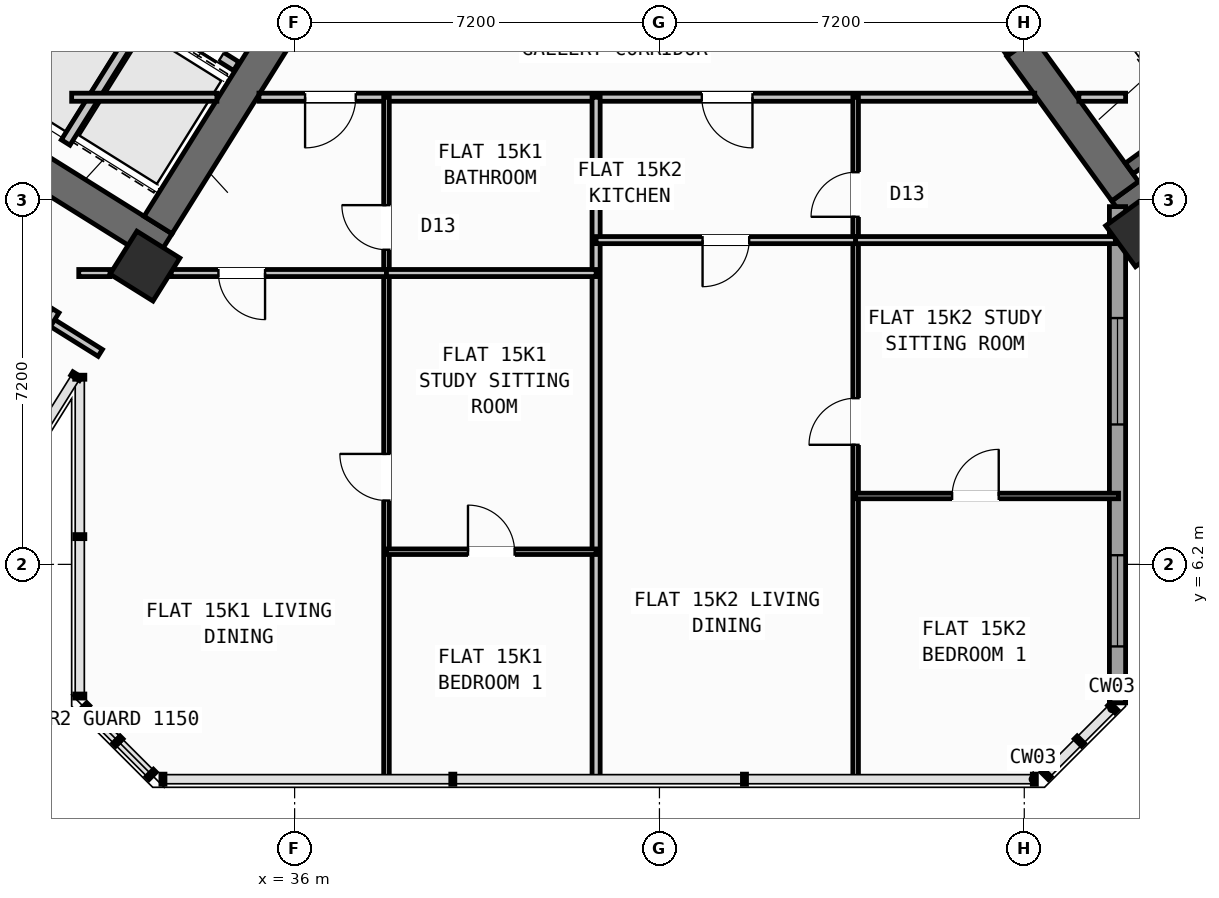
"""IFC4 building model, lengths in metres.
Left out: names, types, materials, properties, quantities, classifications, styles, units other than length and angle.
Written with IfcOpenShell. Run it as: python <this file> out.ifc"""

import sys

from ifc_helpers import new_model, si_unit, direction, frame, frame_2d, origin, origin_2d, place, context, subcontext, project, spatial, rectangle, hollow_rectangle, extrude, source, transform, mapped, element, fill, save


model = new_model("IFC4")
c1 = context("Model", 3, precision=1e-05, world=origin(), true_north=direction((0.0, 1.0)))
c2 = subcontext(c1, "Body", "Model", "MODEL_VIEW")
j1 = project(units=[si_unit("LENGTHUNIT", "METRE"), si_unit("PLANEANGLEUNIT", "RADIAN")], contexts=[c1])
p1 = place(None, origin())
s1 = spatial("IfcSite", under=j1, at=p1, CompositionType="ELEMENT")
p2 = place(p1, origin())
s2 = spatial("IfcBuilding", under=s1, at=p2, CompositionType="ELEMENT")
p3 = place(p2, frame((0.0, 0.0, 60.0)))
s3 = spatial("IfcBuildingStorey", under=s2, at=p3, CompositionType="ELEMENT", Elevation=60.0)
p4 = place(p3, frame((33.409, 12.45, 0.0), z_axis=(0.0, 0.0, 1.0), x_axis=(-0.848051132073, 0.529914405721, 0.0)))
e1 = element("IfcWall", 1, at=p4, inside=s3, PredefinedType="SHEAR", context=c2, shape_type="SweptSolid", body=[
    extrude(rectangle(XDim=13.24, YDim=0.65, at=frame_2d((6.62, 0.0))), origin(), (0.0, 0.0, 1.0), 3.35),
])
p5 = place(p3, frame((36.683, 18.304, 0.0), z_axis=(0.0, 0.0, 1.0), x_axis=(-0.529899109053, -0.848060690178, 0.0)))
e2 = element("IfcWall", 2, at=p5, inside=s3, PredefinedType="SHEAR", context=c2, shape_type="SweptSolid", body=[
    extrude(rectangle(XDim=6.375, YDim=0.65, at=frame_2d((3.188, 0.0))), origin(), (0.0, 0.0, 1.0), 3.35),
])
p6 = place(p3, frame((52.318, 13.11, 0.0), z_axis=(0.0, 0.0, 1.0), x_axis=(0.809019445368, 0.587781878776, 0.0)))
e3 = element("IfcWall", 3, at=p6, inside=s3, PredefinedType="SHEAR", context=c2, shape_type="SweptSolid", body=[
    extrude(rectangle(XDim=12.44, YDim=0.65, at=frame_2d((6.22, 0.0))), origin(), (0.0, 0.0, 1.0), 3.35),
])
p7 = place(p3, frame((52.39, 13.564, 0.0), z_axis=(0.0, 0.0, 1.0), x_axis=(-0.58779688989, 0.809008539037, 0.0)))
e4 = element("IfcWall", 4, at=p7, inside=s3, PredefinedType="SHEAR", context=c2, shape_type="SweptSolid", body=[
    extrude(rectangle(XDim=3.525, YDim=0.65, at=frame_2d((1.763, 0.0))), origin(), (0.0, 0.0, 1.0), 3.35),
])
m1 = source(origin(), c2, "Body", "SweptSolid", [
    extrude(hollow_rectangle(XDim=1.0, YDim=1.0, WallThickness=0.04, at=origin_2d()), origin(), (0.0, 0.0, 1.0), 3.6),
])
for number, where, z_axis, x_axis in (
    (5, (33.046, 12.087, 0.0), (0.0, 0.0, 1.0), (-0.848, 0.53, 0.0)),
    (6, (52.705, 12.773, 0.0), (0.0, 0.0, 1.0), (0.809, 0.588, 0.0)),
):
    element("IfcColumn", number, at=place(p3, frame(where, z_axis=z_axis, x_axis=x_axis)), inside=s3, PredefinedType="COLUMN", context=c2, shape_type="MappedRepresentation", body=[
        mapped(m1, transform((0.0, 0.0, 0.0), scale=1.0)),
    ])
p8 = place(p3, frame((56.581, 7.439, 0.0), z_axis=(0.0, 0.0, 1.0), x_axis=(-0.587785875463, 0.809016541614, 0.0)))
e7 = element("IfcWall", 7, at=p8, inside=s3, PredefinedType="STANDARD", context=c2, shape_type="SweptSolid", body=[
    extrude(rectangle(XDim=6.774, YDim=0.32, at=frame_2d((3.387, 0.0))), origin(), (0.0, 0.0, 1.0), 2.725),
])
p9 = place(p8, frame((1.556, 0.0, 0.8)))
e8 = element("IfcOpeningElement", 8, at=p9, cuts=e7, PredefinedType="OPENING", context=c2, shape_type="SweptSolid", body=[
    extrude(rectangle(XDim=2.1, YDim=1.55, at=frame_2d((1.05, 0.775))), frame((0.0, 0.17, 0.0), z_axis=(0.0, -1.0, 0.0), x_axis=(1.0, 0.0, 0.0)), (0.0, 0.0, 1.0), 0.34),
])
p10 = place(p3, frame((52.24, 13.261, 0.0), z_axis=(0.0, 0.0, 1.0), x_axis=(0.0, -1.0, 0.0)))
e9 = element("IfcWall", 9, at=p10, inside=s3, PredefinedType="STANDARD", context=c2, shape_type="SweptSolid", body=[
    extrude(rectangle(XDim=9.795, YDim=0.32, at=frame_2d((4.897, 0.0))), origin(), (0.0, 0.0, 1.0), 3.35),
])
p11 = place(p10, frame((2.199, 0.0, 0.8)))
e10 = element("IfcOpeningElement", 10, at=p11, cuts=e9, PredefinedType="OPENING", context=c2, shape_type="SweptSolid", body=[
    extrude(rectangle(XDim=2.1, YDim=1.55, at=frame_2d((1.05, 0.775))), frame((0.0, 0.17, 0.0), z_axis=(0.0, -1.0, 0.0), x_axis=(1.0, 0.0, 0.0)), (0.0, 0.0, 1.0), 0.34),
])
p12 = place(p10, frame((6.88, 0.0, 0.85)))
e11 = element("IfcOpeningElement", 11, at=p12, cuts=e9, PredefinedType="OPENING", context=c2, shape_type="SweptSolid", body=[
    extrude(rectangle(XDim=1.8, YDim=1.5, at=frame_2d((0.9, 0.75))), frame((0.0, 0.17, 0.0), z_axis=(0.0, -1.0, 0.0), x_axis=(1.0, 0.0, 0.0)), (0.0, 0.0, 1.0), 0.34),
])
p13 = place(p3, frame((31.288, 18.256, 0.0), z_axis=(0.0, 0.0, 1.0), x_axis=(-0.529943379326, -0.848033026897, 0.0)))
e12 = element("IfcWall", 12, at=p13, inside=s3, PredefinedType="SHEAR", context=c2, shape_type="SweptSolid", body=[
    extrude(rectangle(XDim=3.16, YDim=0.26, at=frame_2d((1.58, 0.0))), origin(), (0.0, 0.0, 1.0), 3.35),
])
p14 = place(p3, frame((34.848, 16.031, 0.0), z_axis=(0.0, 0.0, 1.0), x_axis=(-0.848044042236, 0.529925751807, 0.0)))
e13 = element("IfcWall", 13, at=p14, inside=s3, PredefinedType="STANDARD", context=c2, shape_type="SweptSolid", body=[
    extrude(rectangle(XDim=4.198, YDim=0.2, at=frame_2d((2.099, 0.0))), origin(), (0.0, 0.0, 1.0), 3.34),
])
p15 = place(p14, frame((0.348, 0.0, 0.0)))
e14 = element("IfcOpeningElement", 14, at=p15, cuts=e13, PredefinedType="OPENING", context=c2, shape_type="SweptSolid", body=[
    extrude(rectangle(XDim=1.3, YDim=2.2, at=frame_2d((0.65, 1.1))), frame((0.0, 0.11, 0.0), z_axis=(0.0, -1.0, 0.0), x_axis=(1.0, 0.0, 0.0)), (0.0, 0.0, 1.0), 0.22),
])
p16 = place(p14, frame((2.423, 0.0, 0.0)))
e15 = element("IfcOpeningElement", 15, at=p16, cuts=e13, PredefinedType="OPENING", context=c2, shape_type="SweptSolid", body=[
    extrude(rectangle(XDim=1.45, YDim=2.25, at=frame_2d((0.725, 1.125))), frame((0.0, 0.11, 0.0), z_axis=(0.0, -1.0, 0.0), x_axis=(1.0, 0.0, 0.0)), (0.0, 0.0, 1.0), 0.22),
])
p17 = place(p3, frame((33.029, 17.003, 0.0), z_axis=(0.0, 0.0, 1.0), x_axis=(-0.529916267533, -0.848049968695, 0.0)))
e16 = element("IfcWall", 16, at=p17, inside=s3, PredefinedType="STANDARD", context=c2, shape_type="SweptSolid", body=[
    extrude(rectangle(XDim=2.92, YDim=0.2, at=frame_2d((1.46, 0.0))), origin(), (0.0, 0.0, 1.0), 3.34),
])
p18 = place(p3, frame((52.472, 14.013, 0.0), z_axis=(0.0, 0.0, 1.0), x_axis=(0.809028366311, 0.587769599847, 0.0)))
e17 = element("IfcWall", 17, at=p18, inside=s3, PredefinedType="SHEAR", context=c2, shape_type="SweptSolid", body=[
    extrude(rectangle(XDim=7.33, YDim=0.26, at=frame_2d((3.665, 0.0))), origin(), (0.0, 0.0, 1.0), 3.35),
])
p19 = place(p3, frame((32.164, 10.374, 0.0), z_axis=(0.0, 0.0, 1.0), x_axis=(-0.848044107957, 0.529925646633, 0.0)))
e18 = element("IfcWall", 18, at=p19, inside=s3, PredefinedType="PARTITIONING", context=c2, shape_type="SweptSolid", body=[
    extrude(rectangle(XDim=15.57, YDim=0.16, at=frame_2d((7.785, 0.0))), origin(), (0.0, 0.0, 1.0), 3.34),
])
p20 = place(p19, frame((10.83, 0.0, 0.0)))
e19 = element("IfcOpeningElement", 19, at=p20, cuts=e18, PredefinedType="OPENING", context=c2, shape_type="SweptSolid", body=[
    extrude(rectangle(XDim=1.0, YDim=2.1, at=frame_2d((0.5, 1.05))), frame((0.0, 0.09, 0.0), z_axis=(0.0, -1.0, 0.0), x_axis=(1.0, 0.0, 0.0)), (0.0, 0.0, 1.0), 0.18),
])
p21 = place(p3, frame((31.282, 11.208, 0.0), z_axis=(0.0, 0.0, 1.0), x_axis=(-0.529938869374, -0.84803584519, 0.0)))
e20 = element("IfcWall", 20, at=p21, inside=s3, PredefinedType="PARTITIONING", context=c2, shape_type="SweptSolid", body=[
    extrude(rectangle(XDim=5.48, YDim=0.16, at=frame_2d((2.74, 0.0))), origin(), (0.0, 0.0, 1.0), 3.34),
])
p22 = place(p3, frame((31.6, 15.42, 0.0), z_axis=(0.0, 0.0, 1.0), x_axis=(1.0, 0.0, 0.0)))
e21 = element("IfcWall", 21, at=p22, inside=s3, PredefinedType="PARTITIONING", context=c2, shape_type="SweptSolid", body=[
    extrude(rectangle(XDim=2.866, YDim=0.16, at=frame_2d((1.433, 0.0))), origin(), (0.0, 0.0, 1.0), 3.34),
])
p23 = place(p3, frame((35.296, 15.42, 0.0), z_axis=(0.0, 0.0, 1.0), x_axis=(1.0, 0.0, 0.0)))
e22 = element("IfcWall", 22, at=p23, inside=s3, PredefinedType="PARTITIONING", context=c2, shape_type="SweptSolid", body=[
    extrude(rectangle(XDim=15.311, YDim=0.16, at=frame_2d((7.655, 0.0))), origin(), (0.0, 0.0, 1.0), 3.34),
])
p24 = place(p23, frame((0.91, 0.0, 0.0)))
e23 = element("IfcOpeningElement", 23, at=p24, cuts=e22, PredefinedType="OPENING", context=c2, shape_type="SweptSolid", body=[
    extrude(rectangle(XDim=1.0, YDim=2.1, at=frame_2d((0.5, 1.05))), frame((0.0, 0.09, 0.0), z_axis=(0.0, -1.0, 0.0), x_axis=(1.0, 0.0, 0.0)), (0.0, 0.0, 1.0), 0.18),
])
p25 = place(p23, frame((8.74, 0.0, 0.0)))
e24 = element("IfcOpeningElement", 24, at=p25, cuts=e22, PredefinedType="OPENING", context=c2, shape_type="SweptSolid", body=[
    extrude(rectangle(XDim=1.0, YDim=2.1, at=frame_2d((0.5, 1.05))), frame((0.0, 0.09, 0.0), z_axis=(0.0, -1.0, 0.0), x_axis=(1.0, 0.0, 0.0)), (0.0, 0.0, 1.0), 0.18),
])
p26 = place(p3, frame((51.477, 15.42, 0.0), z_axis=(0.0, 0.0, 1.0), x_axis=(1.0, 0.0, 0.0)))
e25 = element("IfcWall", 25, at=p26, inside=s3, PredefinedType="PARTITIONING", context=c2, shape_type="SweptSolid", body=[
    extrude(rectangle(XDim=0.923, YDim=0.16, at=frame_2d((0.461, 0.0))), origin(), (0.0, 0.0, 1.0), 3.34),
])
p27 = place(p3, frame((50.119, 16.333, 0.0), z_axis=(0.0, 0.0, 1.0), x_axis=(-0.587749856981, 0.809042709391, 0.0)))
e26 = element("IfcWall", 26, at=p27, inside=s3, PredefinedType="STANDARD", context=c2, shape_type="SweptSolid", body=[
    extrude(rectangle(XDim=2.96, YDim=0.2, at=frame_2d((1.48, 0.0))), origin(), (0.0, 0.0, 1.0), 3.34),
])
p28 = place(p27, frame((0.53, 0.0, 0.0)))
e27 = element("IfcOpeningElement", 27, at=p28, cuts=e26, PredefinedType="OPENING", context=c2, shape_type="SweptSolid", body=[
    extrude(rectangle(XDim=1.5, YDim=2.15, at=frame_2d((0.75, 1.075))), frame((0.0, 0.11, 0.0), z_axis=(0.0, -1.0, 0.0), x_axis=(1.0, 0.0, 0.0)), (0.0, 0.0, 1.0), 0.22),
])
p29 = place(p3, frame((41.95, 1.96, 0.0), z_axis=(0.0, 0.0, 1.0), x_axis=(0.0, 1.0, 0.0)))
e28 = element("IfcWall", 28, at=p29, inside=s3, PredefinedType="PARTITIONING", context=c2, shape_type="SweptSolid", body=[
    extrude(rectangle(XDim=13.46, YDim=0.16, at=frame_2d((6.73, 0.0))), origin(), (0.0, 0.0, 1.0), 3.34),
])
p30 = place(p3, frame((37.813, 1.96, 0.0), z_axis=(0.0, 0.0, 1.0), x_axis=(0.0, 1.0, 0.0)))
e29 = element("IfcWall", 29, at=p30, inside=s3, PredefinedType="PARTITIONING", context=c2, shape_type="SweptSolid", body=[
    extrude(rectangle(XDim=13.46, YDim=0.11, at=frame_2d((6.73, 0.0))), origin(), (0.0, 0.0, 1.0), 3.34),
])
p31 = place(p30, frame((5.5, 0.0, 0.0)))
e30 = element("IfcOpeningElement", 30, at=p31, cuts=e29, PredefinedType="OPENING", context=c2, shape_type="SweptSolid", body=[
    extrude(rectangle(XDim=0.92, YDim=2.08, at=frame_2d((0.46, 1.04))), frame((0.0, 0.065, 0.0), z_axis=(0.0, -1.0, 0.0), x_axis=(1.0, 0.0, 0.0)), (0.0, 0.0, 1.0), 0.13),
])
p32 = place(p30, frame((10.45, 0.0, 0.0)))
e31 = element("IfcOpeningElement", 31, at=p32, cuts=e29, PredefinedType="OPENING", context=c2, shape_type="SweptSolid", body=[
    extrude(rectangle(XDim=0.88, YDim=2.08, at=frame_2d((0.44, 1.04))), frame((0.0, 0.065, 0.0), z_axis=(0.0, -1.0, 0.0), x_axis=(1.0, 0.0, 0.0)), (0.0, 0.0, 1.0), 0.13),
])
p33 = place(p3, frame((31.74, 11.95, 0.0), z_axis=(0.0, 0.0, 1.0), x_axis=(1.0, 0.0, 0.0)))
e32 = element("IfcWall", 32, at=p33, inside=s3, PredefinedType="PLUMBINGWALL", context=c2, shape_type="SweptSolid", body=[
    extrude(rectangle(XDim=0.617, YDim=0.14, at=frame_2d((0.309, 0.0))), origin(), (0.0, 0.0, 1.0), 3.34),
])
p34 = place(p3, frame((33.564, 11.95, 0.0), z_axis=(0.0, 0.0, 1.0), x_axis=(1.0, 0.0, 0.0)))
e33 = element("IfcWall", 33, at=p34, inside=s3, PredefinedType="PLUMBINGWALL", context=c2, shape_type="SweptSolid", body=[
    extrude(rectangle(XDim=4.249, YDim=0.14, at=frame_2d((2.124, 0.0))), origin(), (0.0, 0.0, 1.0), 2.525),
])
p35 = place(p34, frame((0.932, 0.0, 0.0)))
e34 = element("IfcOpeningElement", 34, at=p35, cuts=e33, PredefinedType="OPENING", context=c2, shape_type="SweptSolid", body=[
    extrude(rectangle(XDim=0.92, YDim=2.08, at=frame_2d((0.46, 1.04))), frame((0.0, 0.08, 0.0), z_axis=(0.0, -1.0, 0.0), x_axis=(1.0, 0.0, 0.0)), (0.0, 0.0, 1.0), 0.16),
])
p36 = place(p3, frame((37.813, 11.95, 0.0), z_axis=(0.0, 0.0, 1.0), x_axis=(1.0, 0.0, 0.0)))
e35 = element("IfcWall", 35, at=p36, inside=s3, PredefinedType="PLUMBINGWALL", context=c2, shape_type="SweptSolid", body=[
    extrude(rectangle(XDim=4.137, YDim=0.14, at=frame_2d((2.068, 0.0))), origin(), (0.0, 0.0, 1.0), 2.525),
])
p37 = place(p3, frame((37.813, 6.45, 0.0), z_axis=(0.0, 0.0, 1.0), x_axis=(1.0, 0.0, 0.0)))
e36 = element("IfcWall", 36, at=p37, inside=s3, PredefinedType="PARTITIONING", context=c2, shape_type="SweptSolid", body=[
    extrude(rectangle(XDim=4.137, YDim=0.11, at=frame_2d((2.068, 0.0))), origin(), (0.0, 0.0, 1.0), 3.34),
])
p38 = place(p37, frame((1.608, 0.0, 0.0)))
e37 = element("IfcOpeningElement", 37, at=p38, cuts=e36, PredefinedType="OPENING", context=c2, shape_type="SweptSolid", body=[
    extrude(rectangle(XDim=0.92, YDim=2.08, at=frame_2d((0.46, 1.04))), frame((0.0, 0.065, 0.0), z_axis=(0.0, -1.0, 0.0), x_axis=(1.0, 0.0, 0.0)), (0.0, 0.0, 1.0), 0.13),
])
p39 = place(p3, frame((47.072, 1.96, 0.0), z_axis=(0.0, 0.0, 1.0), x_axis=(0.0, 1.0, 0.0)))
e38 = element("IfcWall", 38, at=p39, inside=s3, PredefinedType="PARTITIONING", context=c2, shape_type="SweptSolid", body=[
    extrude(rectangle(XDim=13.46, YDim=0.11, at=frame_2d((6.73, 0.0))), origin(), (0.0, 0.0, 1.0), 3.34),
])
p40 = place(p39, frame((6.6, 0.0, 0.0)))
e39 = element("IfcOpeningElement", 39, at=p40, cuts=e38, PredefinedType="OPENING", context=c2, shape_type="SweptSolid", body=[
    extrude(rectangle(XDim=0.92, YDim=2.08, at=frame_2d((0.46, 1.04))), frame((0.0, 0.065, 0.0), z_axis=(0.0, -1.0, 0.0), x_axis=(1.0, 0.0, 0.0)), (0.0, 0.0, 1.0), 0.13),
])
p41 = place(p39, frame((11.1, 0.0, 0.0)))
e40 = element("IfcOpeningElement", 40, at=p41, cuts=e38, PredefinedType="OPENING", context=c2, shape_type="SweptSolid", body=[
    extrude(rectangle(XDim=0.88, YDim=2.08, at=frame_2d((0.44, 1.04))), frame((0.0, 0.065, 0.0), z_axis=(0.0, -1.0, 0.0), x_axis=(1.0, 0.0, 0.0)), (0.0, 0.0, 1.0), 0.13),
])
p42 = place(p3, frame((41.95, 12.6, 0.0), z_axis=(0.0, 0.0, 1.0), x_axis=(1.0, 0.0, 0.0)))
e41 = element("IfcWall", 41, at=p42, inside=s3, PredefinedType="PLUMBINGWALL", context=c2, shape_type="SweptSolid", body=[
    extrude(rectangle(XDim=5.122, YDim=0.14, at=frame_2d((2.561, 0.0))), origin(), (0.0, 0.0, 1.0), 2.525),
])
p43 = place(p42, frame((2.101, 0.0, 0.0)))
e42 = element("IfcOpeningElement", 42, at=p43, cuts=e41, PredefinedType="OPENING", context=c2, shape_type="SweptSolid", body=[
    extrude(rectangle(XDim=0.92, YDim=2.08, at=frame_2d((0.46, 1.04))), frame((0.0, 0.08, 0.0), z_axis=(0.0, -1.0, 0.0), x_axis=(1.0, 0.0, 0.0)), (0.0, 0.0, 1.0), 0.16),
])
p44 = place(p3, frame((47.072, 12.6, 0.0), z_axis=(0.0, 0.0, 1.0), x_axis=(1.0, 0.0, 0.0)))
e43 = element("IfcWall", 43, at=p44, inside=s3, PredefinedType="PLUMBINGWALL", context=c2, shape_type="SweptSolid", body=[
    extrude(rectangle(XDim=5.126, YDim=0.14, at=frame_2d((2.563, 0.0))), origin(), (0.0, 0.0, 1.0), 2.525),
])
p45 = place(p3, frame((47.072, 7.55, 0.0), z_axis=(0.0, 0.0, 1.0), x_axis=(1.0, 0.0, 0.0)))
e44 = element("IfcWall", 44, at=p45, inside=s3, PredefinedType="PARTITIONING", context=c2, shape_type="SweptSolid", body=[
    extrude(rectangle(XDim=5.188, YDim=0.11, at=frame_2d((2.594, 0.0))), origin(), (0.0, 0.0, 1.0), 3.34),
])
p46 = place(p45, frame((1.904, 0.0, 0.0)))
e45 = element("IfcOpeningElement", 45, at=p46, cuts=e44, PredefinedType="OPENING", context=c2, shape_type="SweptSolid", body=[
    extrude(rectangle(XDim=0.92, YDim=2.08, at=frame_2d((0.46, 1.04))), frame((0.0, 0.065, 0.0), z_axis=(0.0, -1.0, 0.0), x_axis=(1.0, 0.0, 0.0)), (0.0, 0.0, 1.0), 0.13),
])
m2 = source(origin(), c2, "Body", "SweptSolid", [
    extrude(rectangle(XDim=2.1, YDim=1.55, at=frame_2d((1.05, 0.775))), frame((0.0, 0.03, 0.0), z_axis=(0.0, -1.0, 0.0), x_axis=(1.0, 0.0, 0.0)), (0.0, 0.0, 1.0), 0.06),
])
p47 = place(p11, origin())
e46 = element("IfcWindow", 46, at=p47, inside=s3, PartitioningType="SINGLE_PANEL", PredefinedType="WINDOW", context=c2, shape_type="MappedRepresentation", body=[
    mapped(m2, transform((0.0, 0.0, 0.0), scale=1.0)),
])
fill(e10, e46)
m3 = source(origin(), c2, "Body", "SweptSolid", [
    extrude(rectangle(XDim=1.8, YDim=1.5, at=frame_2d((0.9, 0.75))), frame((0.0, 0.03, 0.0), z_axis=(0.0, -1.0, 0.0), x_axis=(1.0, 0.0, 0.0)), (0.0, 0.0, 1.0), 0.06),
])
p48 = place(p12, origin())
e47 = element("IfcWindow", 47, at=p48, inside=s3, PartitioningType="SINGLE_PANEL", PredefinedType="WINDOW", context=c2, shape_type="MappedRepresentation", body=[
    mapped(m3, transform((0.0, 0.0, 0.0), scale=1.0)),
])
fill(e11, e47)
m4 = source(origin(), c2, "Body", "SweptSolid", [
    extrude(rectangle(XDim=1.3, YDim=2.2, at=frame_2d((0.65, 1.1))), frame((0.0, 0.025, 0.0), z_axis=(0.0, -1.0, 0.0), x_axis=(1.0, 0.0, 0.0)), (0.0, 0.0, 1.0), 0.05),
])
p49 = place(p15, origin())
e48 = element("IfcDoor", 48, at=p49, inside=s3, OperationType="DOUBLE_DOOR_SLIDING", PredefinedType="DOOR", context=c2, shape_type="MappedRepresentation", body=[
    mapped(m4, transform((0.0, 0.0, 0.0), scale=1.0)),
])
fill(e14, e48)
m5 = source(origin(), c2, "Body", "SweptSolid", [
    extrude(rectangle(XDim=0.92, YDim=2.08, at=frame_2d((0.46, 1.04))), frame((0.0, 0.025, 0.0), z_axis=(0.0, -1.0, 0.0), x_axis=(1.0, 0.0, 0.0)), (0.0, 0.0, 1.0), 0.05),
])
p50 = place(p31, origin())
e49 = element("IfcDoor", 49, at=p50, inside=s3, OperationType="SINGLE_SWING_RIGHT", PredefinedType="DOOR", context=c2, shape_type="MappedRepresentation", body=[
    mapped(m5, transform((0.0, 0.0, 0.0), scale=1.0)),
])
fill(e30, e49)
p51 = place(p38, origin())
e50 = element("IfcDoor", 50, at=p51, inside=s3, OperationType="SINGLE_SWING_LEFT", PredefinedType="DOOR", context=c2, shape_type="MappedRepresentation", body=[
    mapped(m5, transform((0.0, 0.0, 0.0), scale=1.0)),
])
fill(e37, e50)
m6 = source(origin(), c2, "Body", "SweptSolid", [
    extrude(rectangle(XDim=1.0, YDim=2.1, at=frame_2d((0.5, 1.05))), frame((0.0, 0.025, 0.0), z_axis=(0.0, -1.0, 0.0), x_axis=(1.0, 0.0, 0.0)), (0.0, 0.0, 1.0), 0.05),
])
p52 = place(p24, frame((1.0, 0.0, 0.0), z_axis=(0.0, 0.0, 1.0), x_axis=(-1.0, 0.0, 0.0)))
e51 = element("IfcDoor", 51, at=p52, inside=s3, OperationType="SINGLE_SWING_RIGHT", PredefinedType="DOOR", context=c2, shape_type="MappedRepresentation", body=[
    mapped(m6, transform((0.0, 0.0, 0.0), scale=1.0)),
])
fill(e23, e51)
p53 = place(p35, frame((0.92, 0.0, 0.0), z_axis=(0.0, 0.0, 1.0), x_axis=(-1.0, 0.0, 0.0)))
e52 = element("IfcDoor", 52, at=p53, inside=s3, OperationType="SINGLE_SWING_LEFT", PredefinedType="DOOR", context=c2, shape_type="MappedRepresentation", body=[
    mapped(m5, transform((0.0, 0.0, 0.0), scale=1.0)),
])
fill(e34, e52)
m7 = source(origin(), c2, "Body", "SweptSolid", [
    extrude(rectangle(XDim=0.88, YDim=2.08, at=frame_2d((0.44, 1.04))), frame((0.0, 0.025, 0.0), z_axis=(0.0, -1.0, 0.0), x_axis=(1.0, 0.0, 0.0)), (0.0, 0.0, 1.0), 0.05),
])
p54 = place(p32, origin())
e53 = element("IfcDoor", 53, at=p54, inside=s3, OperationType="SINGLE_SWING_RIGHT", PredefinedType="DOOR", context=c2, shape_type="MappedRepresentation", body=[
    mapped(m7, transform((0.0, 0.0, 0.0), scale=1.0)),
])
fill(e31, e53)
p55 = place(p40, origin())
e54 = element("IfcDoor", 54, at=p55, inside=s3, OperationType="SINGLE_SWING_LEFT", PredefinedType="DOOR", context=c2, shape_type="MappedRepresentation", body=[
    mapped(m5, transform((0.0, 0.0, 0.0), scale=1.0)),
])
fill(e39, e54)
p56 = place(p46, origin())
e55 = element("IfcDoor", 55, at=p56, inside=s3, OperationType="SINGLE_SWING_RIGHT", PredefinedType="DOOR", context=c2, shape_type="MappedRepresentation", body=[
    mapped(m5, transform((0.0, 0.0, 0.0), scale=1.0)),
])
fill(e45, e55)
p57 = place(p25, frame((1.0, 0.0, 0.0), z_axis=(0.0, 0.0, 1.0), x_axis=(-1.0, 0.0, 0.0)))
e56 = element("IfcDoor", 56, at=p57, inside=s3, OperationType="SINGLE_SWING_LEFT", PredefinedType="DOOR", context=c2, shape_type="MappedRepresentation", body=[
    mapped(m6, transform((0.0, 0.0, 0.0), scale=1.0)),
])
fill(e24, e56)
p58 = place(p43, frame((0.92, 0.0, 0.0), z_axis=(0.0, 0.0, 1.0), x_axis=(-1.0, 0.0, 0.0)))
e57 = element("IfcDoor", 57, at=p58, inside=s3, OperationType="SINGLE_SWING_RIGHT", PredefinedType="DOOR", context=c2, shape_type="MappedRepresentation", body=[
    mapped(m5, transform((0.0, 0.0, 0.0), scale=1.0)),
])
fill(e42, e57)
p59 = place(p41, origin())
e58 = element("IfcDoor", 58, at=p59, inside=s3, OperationType="SINGLE_SWING_LEFT", PredefinedType="DOOR", context=c2, shape_type="MappedRepresentation", body=[
    mapped(m7, transform((0.0, 0.0, 0.0), scale=1.0)),
])
fill(e40, e58)
save(model, sys.argv[1])
